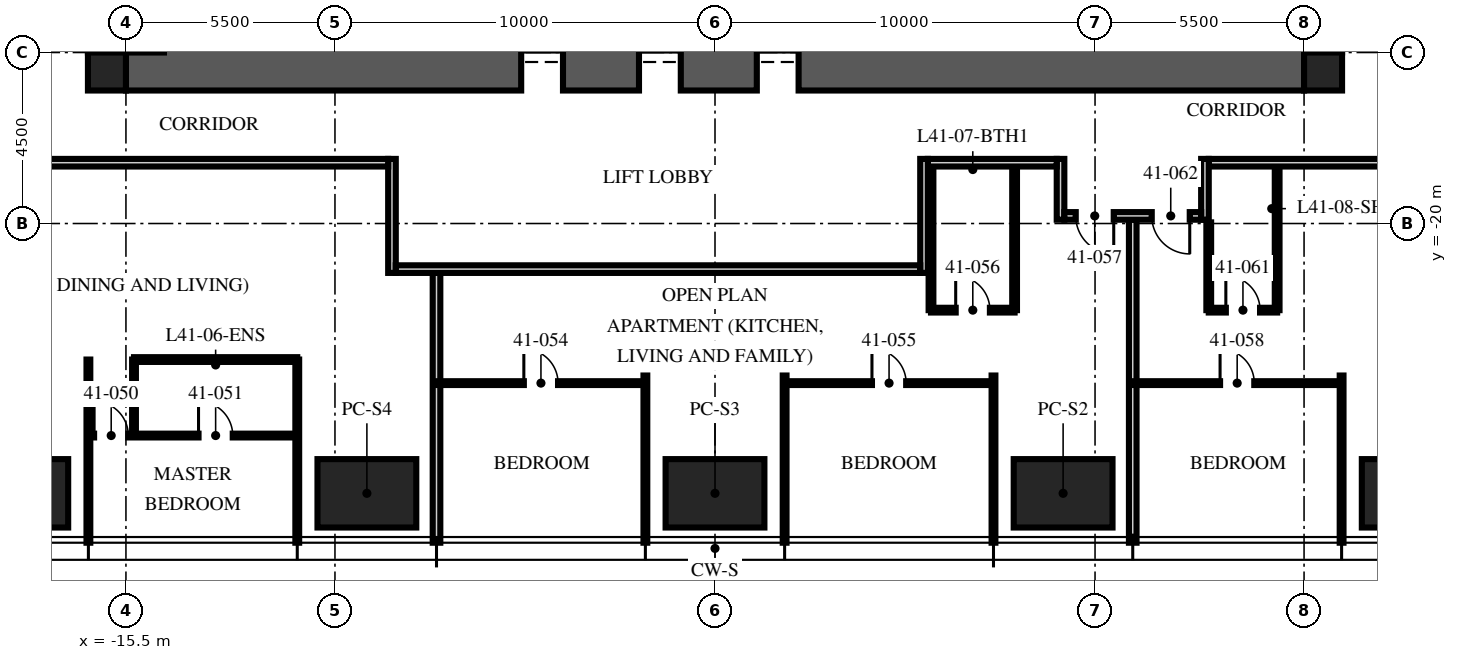
"""IFC4 building model, lengths in metres.
Left out: names, types, materials, properties, quantities, classifications, styles, units other than length and angle.
Written with IfcOpenShell. Run it as: python <this file> out.ifc"""

import sys

from ifc_helpers import new_model, si_unit, direction, frame, frame_2d, origin, origin_2d, place, context, subcontext, project, spatial, rectangle, extrude, element, fill, save


model = new_model("IFC4")
c1 = context("Model", 3, precision=1e-05, world=origin(), true_north=direction((0.0, 1.0)))
c2 = subcontext(c1, "Body", "Model", "MODEL_VIEW")
j1 = project(units=[si_unit("LENGTHUNIT", "METRE"), si_unit("PLANEANGLEUNIT", "RADIAN")], contexts=[c1])
p1 = place(None, origin())
s1 = spatial("IfcSite", under=j1, at=p1, CompositionType="ELEMENT")
p2 = place(p1, origin())
s2 = spatial("IfcBuilding", under=s1, at=p2, CompositionType="ELEMENT")
p3 = place(p2, frame((0.0, 0.0, 163.5)))
s3 = spatial("IfcBuildingStorey", under=s2, at=p3, CompositionType="ELEMENT", Elevation=163.5)
p4 = place(p3, frame((-15.5, -15.5, -0.25), z_axis=(0.0, 0.0, 1.0), x_axis=(1.0, 0.0, 0.0)))
e1 = element("IfcWall", 1, at=p4, inside=s3, PredefinedType="SHEAR", context=c2, shape_type="SweptSolid", body=[
    extrude(rectangle(XDim=31.0, YDim=2.0, at=frame_2d((15.5, 0.0))), origin(), (0.0, 0.0, 1.0), 3.75),
])
p5 = place(p4, frame((10.4, 0.0, 0.25)))
e2 = element("IfcOpeningElement", 2, at=p5, cuts=e1, PredefinedType="OPENING", context=c2, shape_type="SweptSolid", body=[
    extrude(rectangle(XDim=1.1, YDim=2.1, at=frame_2d((0.55, 1.05))), frame((0.0, 1.01, 0.0), z_axis=(0.0, -1.0, 0.0), x_axis=(1.0, 0.0, 0.0)), (0.0, 0.0, 1.0), 2.02),
])
p6 = place(p4, frame((13.5, 0.0, 0.25)))
e3 = element("IfcOpeningElement", 3, at=p6, cuts=e1, PredefinedType="OPENING", context=c2, shape_type="SweptSolid", body=[
    extrude(rectangle(XDim=1.1, YDim=2.1, at=frame_2d((0.55, 1.05))), frame((0.0, 1.01, 0.0), z_axis=(0.0, -1.0, 0.0), x_axis=(1.0, 0.0, 0.0)), (0.0, 0.0, 1.0), 2.02),
])
p7 = place(p4, frame((16.6, 0.0, 0.25)))
e4 = element("IfcOpeningElement", 4, at=p7, cuts=e1, PredefinedType="OPENING", context=c2, shape_type="SweptSolid", body=[
    extrude(rectangle(XDim=1.1, YDim=2.1, at=frame_2d((0.55, 1.05))), frame((0.0, 1.01, 0.0), z_axis=(0.0, -1.0, 0.0), x_axis=(1.0, 0.0, 0.0)), (0.0, 0.0, 1.0), 2.02),
])
for number, where, z_axis, x_axis in (
    (5, (-16.0, -16.0, -0.25), (0.0, 0.0, 1.0), (1.0, 0.0, 0.0)),
    (6, (16.0, -16.0, -0.25), (0.0, 0.0, 1.0), (1.0, 0.0, 0.0)),
):
    element("IfcColumn", number, at=place(p3, frame(where, z_axis=z_axis, x_axis=x_axis)), inside=s3, PredefinedType="COLUMN", context=c2, shape_type="SweptSolid", body=[
        extrude(rectangle(XDim=1.0, YDim=1.0, at=origin_2d()), origin(), (0.0, 0.0, 1.0), 3.75),
    ])
for number, where, z_axis, x_axis in (
    (7, (18.32, -27.1, 0.0), (0.0, 0.0, 1.0), (1.0, 0.0, 0.0)),
    (8, (9.16, -27.1, 0.0), (0.0, 0.0, 1.0), (1.0, 0.0, 0.0)),
    (9, (0.0, -27.1, 0.0), (0.0, 0.0, 1.0), (1.0, 0.0, 0.0)),
    (10, (-9.16, -27.1, 0.0), (0.0, 0.0, 1.0), (1.0, 0.0, 0.0)),
    (11, (-18.32, -27.1, 0.0), (0.0, 0.0, 1.0), (1.0, 0.0, 0.0)),
):
    element("IfcColumn", number, at=place(p3, frame(where, z_axis=z_axis, x_axis=x_axis)), inside=s3, PredefinedType="COLUMN", context=c2, shape_type="SweptSolid", body=[
        extrude(rectangle(XDim=2.6, YDim=1.8, at=origin_2d()), origin(), (0.0, 0.0, 1.0), 3.75),
    ])
for number, where, z_axis, x_axis in (
    (12, (-16.488, -23.58, 0.0), (0.0, 0.0, 1.0), (0.0, -1.0, 0.0)),
    (13, (-10.992, -23.58, 0.0), (0.0, 0.0, 1.0), (0.0, -1.0, 0.0)),
):
    element("IfcWall", number, at=place(p3, frame(where, z_axis=z_axis, x_axis=x_axis)), inside=s3, PredefinedType="PARTITIONING", context=c2, shape_type="SweptSolid", body=[
        extrude(rectangle(XDim=4.82, YDim=0.1, at=frame_2d((2.41, 0.0))), origin(), (0.0, 0.0, 1.0), 2.81),
    ])
p8 = place(p3, frame((-7.328, -21.3, 0.0), z_axis=(0.0, 0.0, 1.0), x_axis=(0.0, -1.0, 0.0)))
e14 = element("IfcWall", 14, at=p8, inside=s3, PredefinedType="PARTITIONING", context=c2, shape_type="SweptSolid", body=[
    extrude(rectangle(XDim=7.1, YDim=0.2, at=frame_2d((3.55, 0.0))), origin(), (0.0, 0.0, 1.0), 2.81),
])
for number, where, z_axis, x_axis in (
    (15, (-1.832, -24.0, 0.0), (0.0, 0.0, 1.0), (0.0, -1.0, 0.0)),
    (16, (1.832, -24.0, 0.0), (0.0, 0.0, 1.0), (0.0, -1.0, 0.0)),
    (17, (7.328, -24.0, 0.0), (0.0, 0.0, 1.0), (0.0, -1.0, 0.0)),
):
    element("IfcWall", number, at=place(p3, frame(where, z_axis=z_axis, x_axis=x_axis)), inside=s3, PredefinedType="PARTITIONING", context=c2, shape_type="SweptSolid", body=[
        extrude(rectangle(XDim=4.4, YDim=0.1, at=frame_2d((2.2, 0.0))), origin(), (0.0, 0.0, 1.0), 2.81),
    ])
p9 = place(p3, frame((10.992, -19.9, 0.0), z_axis=(0.0, 0.0, 1.0), x_axis=(0.0, -1.0, 0.0)))
e18 = element("IfcWall", 18, at=p9, inside=s3, PredefinedType="PARTITIONING", context=c2, shape_type="SweptSolid", body=[
    extrude(rectangle(XDim=8.5, YDim=0.2, at=frame_2d((4.25, 0.0))), origin(), (0.0, 0.0, 1.0), 2.81),
])
p10 = place(p3, frame((16.488, -24.0, 0.0), z_axis=(0.0, 0.0, 1.0), x_axis=(0.0, -1.0, 0.0)))
e19 = element("IfcWall", 19, at=p10, inside=s3, PredefinedType="PARTITIONING", context=c2, shape_type="SweptSolid", body=[
    extrude(rectangle(XDim=4.4, YDim=0.1, at=frame_2d((2.2, 0.0))), origin(), (0.0, 0.0, 1.0), 2.81),
])
p11 = place(p3, frame((-16.488, -25.58, 0.0), z_axis=(0.0, 0.0, 1.0), x_axis=(1.0, 0.0, 0.0)))
e20 = element("IfcWall", 20, at=p11, inside=s3, PredefinedType="PARTITIONING", context=c2, shape_type="SweptSolid", body=[
    extrude(rectangle(XDim=5.496, YDim=0.1, at=frame_2d((2.748, 0.0))), origin(), (0.0, 0.0, 1.0), 2.81),
])
p12 = place(p11, frame((0.15, 0.0, 0.0)))
e21 = element("IfcOpeningElement", 21, at=p12, cuts=e20, PredefinedType="OPENING", context=c2, shape_type="SweptSolid", body=[
    extrude(rectangle(XDim=0.9, YDim=2.1, at=frame_2d((0.45, 1.05))), frame((0.0, 0.06, 0.0), z_axis=(0.0, -1.0, 0.0), x_axis=(1.0, 0.0, 0.0)), (0.0, 0.0, 1.0), 0.12),
])
p13 = place(p11, frame((2.898, 0.0, 0.0)))
e22 = element("IfcOpeningElement", 22, at=p13, cuts=e20, PredefinedType="OPENING", context=c2, shape_type="SweptSolid", body=[
    extrude(rectangle(XDim=0.9, YDim=2.1, at=frame_2d((0.45, 1.05))), frame((0.0, 0.06, 0.0), z_axis=(0.0, -1.0, 0.0), x_axis=(1.0, 0.0, 0.0)), (0.0, 0.0, 1.0), 0.12),
])
p14 = place(p3, frame((-15.288, -23.58, 0.0), z_axis=(0.0, 0.0, 1.0), x_axis=(0.0, -1.0, 0.0)))
e23 = element("IfcWall", 23, at=p14, inside=s3, PredefinedType="PARTITIONING", context=c2, shape_type="SweptSolid", body=[
    extrude(rectangle(XDim=2.0, YDim=0.1, at=frame_2d((1.0, 0.0))), origin(), (0.0, 0.0, 1.0), 3.5),
])
p15 = place(p3, frame((-15.288, -23.58, 0.0), z_axis=(0.0, 0.0, 1.0), x_axis=(1.0, 0.0, 0.0)))
e24 = element("IfcWall", 24, at=p15, inside=s3, PredefinedType="PARTITIONING", context=c2, shape_type="SweptSolid", body=[
    extrude(rectangle(XDim=4.296, YDim=0.125, at=frame_2d((2.148, 0.0))), origin(), (0.0, 0.0, 1.0), 2.81),
])
p16 = place(p3, frame((-7.328, -24.2, 0.0), z_axis=(0.0, 0.0, 1.0), x_axis=(1.0, 0.0, 0.0)))
e25 = element("IfcWall", 25, at=p16, inside=s3, PredefinedType="PARTITIONING", context=c2, shape_type="SweptSolid", body=[
    extrude(rectangle(XDim=5.496, YDim=0.1, at=frame_2d((2.748, 0.0))), origin(), (0.0, 0.0, 1.0), 2.81),
])
p17 = place(p16, frame((2.298, 0.0, 0.0)))
e26 = element("IfcOpeningElement", 26, at=p17, cuts=e25, PredefinedType="OPENING", context=c2, shape_type="SweptSolid", body=[
    extrude(rectangle(XDim=0.9, YDim=2.1, at=frame_2d((0.45, 1.05))), frame((0.0, 0.06, 0.0), z_axis=(0.0, -1.0, 0.0), x_axis=(1.0, 0.0, 0.0)), (0.0, 0.0, 1.0), 0.12),
])
p18 = place(p3, frame((1.832, -24.2, 0.0), z_axis=(0.0, 0.0, 1.0), x_axis=(1.0, 0.0, 0.0)))
e27 = element("IfcWall", 27, at=p18, inside=s3, PredefinedType="PARTITIONING", context=c2, shape_type="SweptSolid", body=[
    extrude(rectangle(XDim=5.496, YDim=0.1, at=frame_2d((2.748, 0.0))), origin(), (0.0, 0.0, 1.0), 2.81),
])
p19 = place(p18, frame((2.298, 0.0, 0.0)))
e28 = element("IfcOpeningElement", 28, at=p19, cuts=e27, PredefinedType="OPENING", context=c2, shape_type="SweptSolid", body=[
    extrude(rectangle(XDim=0.9, YDim=2.1, at=frame_2d((0.45, 1.05))), frame((0.0, 0.06, 0.0), z_axis=(0.0, -1.0, 0.0), x_axis=(1.0, 0.0, 0.0)), (0.0, 0.0, 1.0), 0.12),
])
p20 = place(p3, frame((5.684, -22.28, 0.0), z_axis=(0.0, 0.0, 1.0), x_axis=(1.0, 0.0, 0.0)))
e29 = element("IfcWall", 29, at=p20, inside=s3, PredefinedType="PARTITIONING", context=c2, shape_type="SweptSolid", body=[
    extrude(rectangle(XDim=2.2, YDim=0.125, at=frame_2d((1.1, 0.0))), origin(), (0.0, 0.0, 1.0), 3.5),
])
p21 = place(p20, frame((0.65, 0.0, 0.0)))
e30 = element("IfcOpeningElement", 30, at=p21, cuts=e29, PredefinedType="OPENING", context=c2, shape_type="SweptSolid", body=[
    extrude(rectangle(XDim=0.9, YDim=2.1, at=frame_2d((0.45, 1.05))), frame((0.0, 0.073, 0.0), z_axis=(0.0, -1.0, 0.0), x_axis=(1.0, 0.0, 0.0)), (0.0, 0.0, 1.0), 0.145),
])
for number, where, z_axis, x_axis in (
    (31, (5.684, -18.5, 0.0), (0.0, 0.0, 1.0), (0.0, -1.0, 0.0)),
    (32, (7.884, -18.5, 0.0), (0.0, 0.0, 1.0), (0.0, -1.0, 0.0)),
):
    element("IfcWall", number, at=place(p3, frame(where, z_axis=z_axis, x_axis=x_axis)), inside=s3, PredefinedType="PARTITIONING", context=c2, shape_type="SweptSolid", body=[
        extrude(rectangle(XDim=3.78, YDim=0.125, at=frame_2d((1.89, 0.0))), origin(), (0.0, 0.0, 1.0), 3.5),
    ])
p22 = place(p3, frame((10.992, -24.2, 0.0), z_axis=(0.0, 0.0, 1.0), x_axis=(1.0, 0.0, 0.0)))
e33 = element("IfcWall", 33, at=p22, inside=s3, PredefinedType="PARTITIONING", context=c2, shape_type="SweptSolid", body=[
    extrude(rectangle(XDim=5.496, YDim=0.1, at=frame_2d((2.748, 0.0))), origin(), (0.0, 0.0, 1.0), 2.81),
])
p23 = place(p22, frame((2.298, 0.0, 0.0)))
e34 = element("IfcOpeningElement", 34, at=p23, cuts=e33, PredefinedType="OPENING", context=c2, shape_type="SweptSolid", body=[
    extrude(rectangle(XDim=0.9, YDim=2.1, at=frame_2d((0.45, 1.05))), frame((0.0, 0.06, 0.0), z_axis=(0.0, -1.0, 0.0), x_axis=(1.0, 0.0, 0.0)), (0.0, 0.0, 1.0), 0.12),
])
p24 = place(p3, frame((12.992, -22.28, 0.0), z_axis=(0.0, 0.0, 1.0), x_axis=(1.0, 0.0, 0.0)))
e35 = element("IfcWall", 35, at=p24, inside=s3, PredefinedType="PARTITIONING", context=c2, shape_type="SweptSolid", body=[
    extrude(rectangle(XDim=1.8, YDim=0.125, at=frame_2d((0.9, 0.0))), origin(), (0.0, 0.0, 1.0), 2.81),
])
p25 = place(p24, frame((0.45, 0.0, 0.0)))
e36 = element("IfcOpeningElement", 36, at=p25, cuts=e35, PredefinedType="OPENING", context=c2, shape_type="SweptSolid", body=[
    extrude(rectangle(XDim=0.9, YDim=2.1, at=frame_2d((0.45, 1.05))), frame((0.0, 0.073, 0.0), z_axis=(0.0, -1.0, 0.0), x_axis=(1.0, 0.0, 0.0)), (0.0, 0.0, 1.0), 0.145),
])
p26 = place(p3, frame((12.992, -19.97, 0.0), z_axis=(0.0, 0.0, 1.0), x_axis=(0.0, -1.0, 0.0)))
e37 = element("IfcWall", 37, at=p26, inside=s3, PredefinedType="PARTITIONING", context=c2, shape_type="SweptSolid", body=[
    extrude(rectangle(XDim=2.31, YDim=0.125, at=frame_2d((1.155, 0.0))), origin(), (0.0, 0.0, 1.0), 3.5),
])
p27 = place(p3, frame((14.792, -18.5, 0.0), z_axis=(0.0, 0.0, 1.0), x_axis=(0.0, -1.0, 0.0)))
e38 = element("IfcWall", 38, at=p27, inside=s3, PredefinedType="PARTITIONING", context=c2, shape_type="SweptSolid", body=[
    extrude(rectangle(XDim=3.78, YDim=0.125, at=frame_2d((1.89, 0.0))), origin(), (0.0, 0.0, 1.0), 3.5),
])
p28 = place(p3, frame((18.5, -18.4, 0.0), z_axis=(0.0, 0.0, 1.0), x_axis=(-1.0, 0.0, 0.0)))
e39 = element("IfcWall", 39, at=p28, inside=s3, PredefinedType="PARTITIONING", context=c2, shape_type="SweptSolid", body=[
    extrude(rectangle(XDim=5.508, YDim=0.2, at=frame_2d((2.754, 0.0))), origin(), (0.0, 0.0, 1.0), 2.3),
])
p29 = place(p3, frame((12.892, -18.3, 0.0), z_axis=(0.0, 0.0, 1.0), x_axis=(0.0, -1.0, 0.0)))
e40 = element("IfcWall", 40, at=p29, inside=s3, PredefinedType="PARTITIONING", context=c2, shape_type="SweptSolid", body=[
    extrude(rectangle(XDim=1.6, YDim=0.2, at=frame_2d((0.8, 0.0))), origin(), (0.0, 0.0, 1.0), 3.5),
])
p30 = place(p3, frame((9.092, -18.3, 0.0), z_axis=(0.0, 0.0, 1.0), x_axis=(0.0, -1.0, 0.0)))
e41 = element("IfcWall", 41, at=p30, inside=s3, PredefinedType="PARTITIONING", context=c2, shape_type="SweptSolid", body=[
    extrude(rectangle(XDim=1.6, YDim=0.2, at=frame_2d((0.8, 0.0))), origin(), (0.0, 0.0, 1.0), 2.7),
])
p31 = place(p3, frame((12.792, -19.8, 0.0), z_axis=(0.0, 0.0, 1.0), x_axis=(-1.0, 0.0, 0.0)))
e42 = element("IfcWall", 42, at=p31, inside=s3, PredefinedType="PARTITIONING", context=c2, shape_type="SweptSolid", body=[
    extrude(rectangle(XDim=3.6, YDim=0.2, at=frame_2d((1.8, 0.0))), origin(), (0.0, 0.0, 1.0), 2.7),
])
p32 = place(p31, frame((2.3, 0.0, 0.0)))
e43 = element("IfcOpeningElement", 43, at=p32, cuts=e42, PredefinedType="OPENING", context=c2, shape_type="SweptSolid", body=[
    extrude(rectangle(XDim=1.0, YDim=2.2, at=frame_2d((0.5, 1.1))), frame((0.0, 0.11, 0.0), z_axis=(0.0, -1.0, 0.0), x_axis=(1.0, 0.0, 0.0)), (0.0, 0.0, 1.0), 0.22),
])
p33 = place(p31, frame((0.3, 0.0, 0.0)))
e44 = element("IfcOpeningElement", 44, at=p33, cuts=e42, PredefinedType="OPENING", context=c2, shape_type="SweptSolid", body=[
    extrude(rectangle(XDim=1.0, YDim=2.2, at=frame_2d((0.5, 1.1))), frame((0.0, 0.11, 0.0), z_axis=(0.0, -1.0, 0.0), x_axis=(1.0, 0.0, 0.0)), (0.0, 0.0, 1.0), 0.22),
])
p34 = place(p3, frame((8.992, -18.4, 0.0), z_axis=(0.0, 0.0, 1.0), x_axis=(-1.0, 0.0, 0.0)))
e45 = element("IfcWall", 45, at=p34, inside=s3, PredefinedType="PARTITIONING", context=c2, shape_type="SweptSolid", body=[
    extrude(rectangle(XDim=3.392, YDim=0.2, at=frame_2d((1.696, 0.0))), origin(), (0.0, 0.0, 1.0), 3.5),
])
for number, where, z_axis, x_axis in (
    (46, (5.5, -18.3, 0.0), (0.0, 0.0, 1.0), (0.0, -1.0, 0.0)),
    (47, (-8.5, -18.3, 0.0), (0.0, 0.0, 1.0), (0.0, -1.0, 0.0)),
):
    element("IfcWall", number, at=place(p3, frame(where, z_axis=z_axis, x_axis=x_axis)), inside=s3, PredefinedType="PARTITIONING", context=c2, shape_type="SweptSolid", body=[
        extrude(rectangle(XDim=3.0, YDim=0.2, at=frame_2d((1.5, 0.0))), origin(), (0.0, 0.0, 1.0), 3.5),
    ])
p35 = place(p3, frame((5.4, -21.2, 0.0), z_axis=(0.0, 0.0, 1.0), x_axis=(-1.0, 0.0, 0.0)))
e48 = element("IfcWall", 48, at=p35, inside=s3, PredefinedType="PARTITIONING", context=c2, shape_type="SweptSolid", body=[
    extrude(rectangle(XDim=13.8, YDim=0.2, at=frame_2d((6.9, 0.0))), origin(), (0.0, 0.0, 1.0), 2.7),
])
p36 = place(p3, frame((-8.6, -18.4, 0.0), z_axis=(0.0, 0.0, 1.0), x_axis=(-1.0, 0.0, 0.0)))
e49 = element("IfcWall", 49, at=p36, inside=s3, PredefinedType="PARTITIONING", context=c2, shape_type="SweptSolid", body=[
    extrude(rectangle(XDim=9.9, YDim=0.2, at=frame_2d((4.95, 0.0))), origin(), (0.0, 0.0, 1.0), 2.3),
])
p37 = place(p5, origin())
e50 = element("IfcDoor", 50, at=p37, inside=s3, OperationType="DOUBLE_DOOR_SLIDING", PredefinedType="DOOR", context=c2, shape_type="SweptSolid", body=[
    extrude(rectangle(XDim=1.1, YDim=2.1, at=frame_2d((0.55, 1.05))), frame((0.0, 0.025, 0.0), z_axis=(0.0, -1.0, 0.0), x_axis=(1.0, 0.0, 0.0)), (0.0, 0.0, 1.0), 0.05),
])
fill(e2, e50)
p38 = place(p6, origin())
e51 = element("IfcDoor", 51, at=p38, inside=s3, OperationType="DOUBLE_DOOR_SLIDING", PredefinedType="DOOR", context=c2, shape_type="SweptSolid", body=[
    extrude(rectangle(XDim=1.1, YDim=2.1, at=frame_2d((0.55, 1.05))), frame((0.0, 0.025, 0.0), z_axis=(0.0, -1.0, 0.0), x_axis=(1.0, 0.0, 0.0)), (0.0, 0.0, 1.0), 0.05),
])
fill(e3, e51)
p39 = place(p7, origin())
e52 = element("IfcDoor", 52, at=p39, inside=s3, OperationType="DOUBLE_DOOR_SLIDING", PredefinedType="DOOR", context=c2, shape_type="SweptSolid", body=[
    extrude(rectangle(XDim=1.1, YDim=2.1, at=frame_2d((0.55, 1.05))), frame((0.0, 0.025, 0.0), z_axis=(0.0, -1.0, 0.0), x_axis=(1.0, 0.0, 0.0)), (0.0, 0.0, 1.0), 0.05),
])
fill(e4, e52)
p40 = place(p12, origin())
e53 = element("IfcDoor", 53, at=p40, inside=s3, OperationType="SINGLE_SWING_LEFT", PredefinedType="DOOR", context=c2, shape_type="SweptSolid", body=[
    extrude(rectangle(XDim=0.9, YDim=2.1, at=frame_2d((0.45, 1.05))), frame((0.0, 0.025, 0.0), z_axis=(0.0, -1.0, 0.0), x_axis=(1.0, 0.0, 0.0)), (0.0, 0.0, 1.0), 0.05),
])
fill(e21, e53)
p41 = place(p13, origin())
e54 = element("IfcDoor", 54, at=p41, inside=s3, OperationType="SINGLE_SWING_LEFT", PredefinedType="DOOR", context=c2, shape_type="SweptSolid", body=[
    extrude(rectangle(XDim=0.9, YDim=2.1, at=frame_2d((0.45, 1.05))), frame((0.0, 0.025, 0.0), z_axis=(0.0, -1.0, 0.0), x_axis=(1.0, 0.0, 0.0)), (0.0, 0.0, 1.0), 0.05),
])
fill(e22, e54)
p42 = place(p17, origin())
e55 = element("IfcDoor", 55, at=p42, inside=s3, OperationType="SINGLE_SWING_LEFT", PredefinedType="DOOR", context=c2, shape_type="SweptSolid", body=[
    extrude(rectangle(XDim=0.9, YDim=2.1, at=frame_2d((0.45, 1.05))), frame((0.0, 0.025, 0.0), z_axis=(0.0, -1.0, 0.0), x_axis=(1.0, 0.0, 0.0)), (0.0, 0.0, 1.0), 0.05),
])
fill(e26, e55)
p43 = place(p19, origin())
e56 = element("IfcDoor", 56, at=p43, inside=s3, OperationType="SINGLE_SWING_LEFT", PredefinedType="DOOR", context=c2, shape_type="SweptSolid", body=[
    extrude(rectangle(XDim=0.9, YDim=2.1, at=frame_2d((0.45, 1.05))), frame((0.0, 0.025, 0.0), z_axis=(0.0, -1.0, 0.0), x_axis=(1.0, 0.0, 0.0)), (0.0, 0.0, 1.0), 0.05),
])
fill(e28, e56)
p44 = place(p21, origin())
e57 = element("IfcDoor", 57, at=p44, inside=s3, OperationType="SINGLE_SWING_LEFT", PredefinedType="DOOR", context=c2, shape_type="SweptSolid", body=[
    extrude(rectangle(XDim=0.9, YDim=2.1, at=frame_2d((0.45, 1.05))), frame((0.0, 0.025, 0.0), z_axis=(0.0, -1.0, 0.0), x_axis=(1.0, 0.0, 0.0)), (0.0, 0.0, 1.0), 0.05),
])
fill(e30, e57)
p45 = place(p32, origin())
e58 = element("IfcDoor", 58, at=p45, inside=s3, OperationType="SINGLE_SWING_LEFT", PredefinedType="DOOR", context=c2, shape_type="SweptSolid", body=[
    extrude(rectangle(XDim=1.0, YDim=2.2, at=frame_2d((0.5, 1.1))), frame((0.0, 0.025, 0.0), z_axis=(0.0, -1.0, 0.0), x_axis=(1.0, 0.0, 0.0)), (0.0, 0.0, 1.0), 0.05),
])
fill(e43, e58)
p46 = place(p23, origin())
e59 = element("IfcDoor", 59, at=p46, inside=s3, OperationType="SINGLE_SWING_LEFT", PredefinedType="DOOR", context=c2, shape_type="SweptSolid", body=[
    extrude(rectangle(XDim=0.9, YDim=2.1, at=frame_2d((0.45, 1.05))), frame((0.0, 0.025, 0.0), z_axis=(0.0, -1.0, 0.0), x_axis=(1.0, 0.0, 0.0)), (0.0, 0.0, 1.0), 0.05),
])
fill(e34, e59)
p47 = place(p25, origin())
e60 = element("IfcDoor", 60, at=p47, inside=s3, OperationType="SINGLE_SWING_LEFT", PredefinedType="DOOR", context=c2, shape_type="SweptSolid", body=[
    extrude(rectangle(XDim=0.9, YDim=2.1, at=frame_2d((0.45, 1.05))), frame((0.0, 0.025, 0.0), z_axis=(0.0, -1.0, 0.0), x_axis=(1.0, 0.0, 0.0)), (0.0, 0.0, 1.0), 0.05),
])
fill(e36, e60)
p48 = place(p33, origin())
e61 = element("IfcDoor", 61, at=p48, inside=s3, OperationType="SINGLE_SWING_LEFT", PredefinedType="DOOR", context=c2, shape_type="SweptSolid", body=[
    extrude(rectangle(XDim=1.0, YDim=2.2, at=frame_2d((0.5, 1.1))), frame((0.0, 0.025, 0.0), z_axis=(0.0, -1.0, 0.0), x_axis=(1.0, 0.0, 0.0)), (0.0, 0.0, 1.0), 0.05),
])
fill(e44, e61)
save(model, sys.argv[1])
